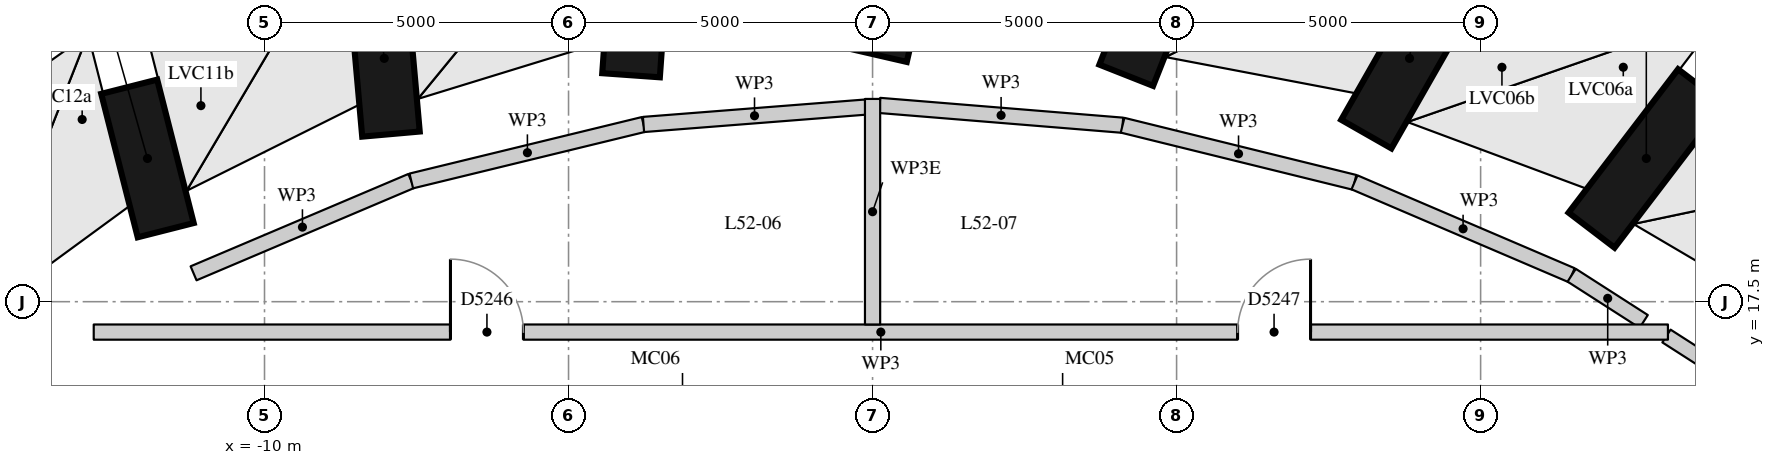
"""IFC4 building model, lengths in metres.
Left out: names, types, materials, properties, quantities, classifications, styles, units other than length and angle.
Written with IfcOpenShell. Run it as: python <this file> out.ifc"""

import sys

from ifc_helpers import new_model, si_unit, direction, frame, frame_2d, origin, origin_2d, place, context, subcontext, project, spatial, rectangle, extrude, element, fill, save


model = new_model("IFC4")
c1 = context("Model", 3, precision=1e-05, world=origin(), true_north=direction((0.0, 1.0)))
c2 = subcontext(c1, "Body", "Model", "MODEL_VIEW")
j1 = project(units=[si_unit("LENGTHUNIT", "METRE"), si_unit("PLANEANGLEUNIT", "RADIAN")], contexts=[c1])
p1 = place(None, origin())
s1 = spatial("IfcSite", under=j1, at=p1, CompositionType="ELEMENT")
p2 = place(p1, origin())
s2 = spatial("IfcBuilding", under=s1, at=p2, CompositionType="ELEMENT")
p3 = place(p2, frame((0.0, 0.0, 184.7)))
s3 = spatial("IfcBuildingStorey", under=s2, at=p3, CompositionType="ELEMENT", Elevation=184.7)
p4 = place(p3, frame((11.825, 18.676, 0.482), z_axis=(0.389978273493, 0.511049786856, 0.765992859992), x_axis=(-0.464682275794, -0.608946175061, 0.642849079055)))
e1 = element("IfcColumn", 1, at=p4, inside=s3, PredefinedType="COLUMN", context=c2, shape_type="SweptSolid", body=[
    extrude(rectangle(XDim=1.5, YDim=0.95, at=origin_2d()), origin(), (0.0, 0.0, 1.0), 4.616),
])
p5 = place(p3, frame((8.12, 20.256, 0.471), z_axis=(0.310881556379, 0.545111045162, 0.778592708896), x_axis=(-0.385719039758, -0.676333814558, 0.627529595839)))
e2 = element("IfcColumn", 2, at=p5, inside=s3, PredefinedType="COLUMN", context=c2, shape_type="SweptSolid", body=[
    extrude(rectangle(XDim=1.5, YDim=0.95, at=origin_2d()), origin(), (0.0, 0.0, 1.0), 4.571),
])
p6 = place(p3, frame((4.172, 21.224, 0.458), z_axis=(0.224562667741, 0.568309652414, 0.79157801083), x_axis=(-0.290898612957, -0.736188660745, 0.611068124492)))
e3 = element("IfcColumn", 3, at=p6, inside=s3, PredefinedType="COLUMN", context=c2, shape_type="SweptSolid", body=[
    extrude(rectangle(XDim=1.5, YDim=0.95, at=origin_2d()), origin(), (0.0, 0.0, 1.0), 4.527),
])
p7 = place(p3, frame((0.1, 21.55, 0.446), z_axis=(0.133671482854, 0.579351901062, 0.804041857995), x_axis=(-0.180764216375, -0.783458746512, 0.594572695801)))
e4 = element("IfcColumn", 4, at=p7, inside=s3, PredefinedType="COLUMN", context=c2, shape_type="SweptSolid", body=[
    extrude(rectangle(XDim=1.5, YDim=0.95, at=origin_2d()), origin(), (0.0, 0.0, 1.0), 4.488),
])
p8 = place(p3, frame((-3.972, 21.224, 0.434), z_axis=(0.04116386065, 0.57760953865, 0.815274651536), x_axis=(-0.057954294046, -0.813212184635, 0.579074470654)))
e5 = element("IfcColumn", 5, at=p8, inside=s3, PredefinedType="COLUMN", context=c2, shape_type="SweptSolid", body=[
    extrude(rectangle(XDim=1.5, YDim=0.95, at=origin_2d()), origin(), (0.0, 0.0, 1.0), 4.454),
])
p9 = place(p3, frame((-7.92, 20.256, 0.424), z_axis=(-0.049857257906, 0.562824465626, 0.825071436136), x_axis=(0.072803061386, -0.821853143195, 0.56502842873)))
e6 = element("IfcColumn", 6, at=p9, inside=s3, PredefinedType="COLUMN", context=c2, shape_type="SweptSolid", body=[
    extrude(rectangle(XDim=1.5, YDim=0.95, at=origin_2d()), origin(), (0.0, 0.0, 1.0), 4.427),
])
p10 = place(p3, frame((-11.625, 18.676, 0.415), z_axis=(-0.136239004263, 0.535533465904, 0.833452362534), x_axis=(0.20548408429, -0.807724663309, 0.552591313166)))
e7 = element("IfcColumn", 7, at=p10, inside=s3, PredefinedType="COLUMN", context=c2, shape_type="SweptSolid", body=[
    extrude(rectangle(XDim=1.5, YDim=0.95, at=origin_2d()), origin(), (0.0, 0.0, 1.0), 4.405),
])
p11 = place(p3, frame((14.718, 15.869, 0.0), z_axis=(0.0, 0.0, 1.0), x_axis=(-0.841680298143, 0.539976180695, 0.0)))
e8 = element("IfcWall", 8, at=p11, inside=s3, PredefinedType="PARTITIONING", context=c2, shape_type="SweptSolid", body=[
    extrude(rectangle(XDim=1.974, YDim=0.25, at=frame_2d((0.987, 0.0))), origin(), (0.0, 0.0, 1.0), 4.22),
])
p12 = place(p3, frame((-7.586, 19.486, 0.0), z_axis=(0.0, 0.0, 1.0), x_axis=(-0.920602981077, -0.390499873536, 0.0)))
e9 = element("IfcWall", 9, at=p12, inside=s3, PredefinedType="PARTITIONING", context=c2, shape_type="SweptSolid", body=[
    extrude(rectangle(XDim=3.889, YDim=0.25, at=frame_2d((1.945, 0.0))), origin(), (0.0, 0.0, 1.0), 4.22),
])
p13 = place(p3, frame((-3.767, 20.415, 0.0), z_axis=(0.0, 0.0, 1.0), x_axis=(-0.971654107781, -0.236407053264, 0.0)))
e10 = element("IfcWall", 10, at=p13, inside=s3, PredefinedType="PARTITIONING", context=c2, shape_type="SweptSolid", body=[
    extrude(rectangle(XDim=3.93, YDim=0.25, at=frame_2d((1.965, 0.0))), origin(), (0.0, 0.0, 1.0), 4.22),
])
p14 = place(p3, frame((-0.116, 20.701, 0.0), z_axis=(0.0, 0.0, 1.0), x_axis=(-0.996948863072, -0.078057443077, 0.0)))
e11 = element("IfcWall", 11, at=p14, inside=s3, PredefinedType="PARTITIONING", context=c2, shape_type="SweptSolid", body=[
    extrude(rectangle(XDim=3.663, YDim=0.25, at=frame_2d((1.831, 0.0))), origin(), (0.0, 0.0, 1.0), 4.22),
])
p15 = place(p3, frame((4.112, 20.402, 0.0), z_axis=(0.0, 0.0, 1.0), x_axis=(-0.996694485566, 0.081241014527, 0.0)))
e12 = element("IfcWall", 12, at=p15, inside=s3, PredefinedType="PARTITIONING", context=c2, shape_type="SweptSolid", body=[
    extrude(rectangle(XDim=4.009, YDim=0.25, at=frame_2d((2.004, 0.0))), origin(), (0.0, 0.0, 1.0), 4.22),
])
p16 = place(p3, frame((7.926, 19.463, 0.0), z_axis=(0.0, 0.0, 1.0), x_axis=(-0.970984692247, 0.239141647194, 0.0)))
e13 = element("IfcWall", 13, at=p16, inside=s3, PredefinedType="PARTITIONING", context=c2, shape_type="SweptSolid", body=[
    extrude(rectangle(XDim=3.928, YDim=0.25, at=frame_2d((1.964, 0.0))), origin(), (0.0, 0.0, 1.0), 4.22),
])
p17 = place(p3, frame((11.498, 17.935, 0.0), z_axis=(0.0, 0.0, 1.0), x_axis=(-0.919440581638, 0.393228962359, 0.0)))
e14 = element("IfcWall", 14, at=p17, inside=s3, PredefinedType="PARTITIONING", context=c2, shape_type="SweptSolid", body=[
    extrude(rectangle(XDim=3.885, YDim=0.25, at=frame_2d((1.942, 0.0))), origin(), (0.0, 0.0, 1.0), 4.22),
])
p18 = place(p3, frame((12.683, 17.175, 0.0), z_axis=(0.0, 0.0, 1.0), x_axis=(-0.84171341623, 0.539924554858, 0.0)))
e15 = element("IfcWall", 15, at=p18, inside=s3, PredefinedType="PARTITIONING", context=c2, shape_type="SweptSolid", body=[
    extrude(rectangle(XDim=1.408, YDim=0.25, at=frame_2d((0.704, 0.0))), origin(), (0.0, 0.0, 1.0), 4.22),
])
p19 = place(p3, frame((-12.809, 17.0, 0.0), z_axis=(0.0, 0.0, 1.0), x_axis=(1.0, 0.0, 0.0)))
e16 = element("IfcWall", 16, at=p19, inside=s3, PredefinedType="PARTITIONING", context=c2, shape_type="SweptSolid", body=[
    extrude(rectangle(XDim=25.889, YDim=0.25, at=frame_2d((12.945, 0.0))), origin(), (0.0, 0.0, 1.0), 4.22),
])
p20 = place(p19, frame((5.867, 0.0, 0.0)))
e17 = element("IfcOpeningElement", 17, at=p20, cuts=e16, PredefinedType="OPENING", context=c2, shape_type="SweptSolid", body=[
    extrude(rectangle(XDim=1.2, YDim=2.1, at=frame_2d((0.6, 1.05))), frame((0.0, 0.135, 0.0), z_axis=(0.0, -1.0, 0.0), x_axis=(1.0, 0.0, 0.0)), (0.0, 0.0, 1.0), 0.27),
])
p21 = place(p19, frame((18.812, 0.0, 0.0)))
e18 = element("IfcOpeningElement", 18, at=p21, cuts=e16, PredefinedType="OPENING", context=c2, shape_type="SweptSolid", body=[
    extrude(rectangle(XDim=1.2, YDim=2.1, at=frame_2d((0.6, 1.05))), frame((0.0, 0.135, 0.0), z_axis=(0.0, -1.0, 0.0), x_axis=(1.0, 0.0, 0.0)), (0.0, 0.0, 1.0), 0.27),
])
p22 = place(p3, frame((0.0, 17.125, 0.0), z_axis=(0.0, 0.0, 1.0), x_axis=(0.0, 1.0, 0.0)))
e19 = element("IfcWall", 19, at=p22, inside=s3, PredefinedType="PARTITIONING", context=c2, shape_type="SweptSolid", body=[
    extrude(rectangle(XDim=3.71, YDim=0.25, at=frame_2d((1.855, 0.0))), origin(), (0.0, 0.0, 1.0), 3.67),
])
p23 = place(p20, origin())
e20 = element("IfcDoor", 20, at=p23, inside=s3, OperationType="SINGLE_SWING_LEFT", PredefinedType="DOOR", context=c2, shape_type="SweptSolid", body=[
    extrude(rectangle(XDim=1.2, YDim=2.1, at=frame_2d((0.6, 1.05))), frame((0.0, 0.025, 0.0), z_axis=(0.0, -1.0, 0.0), x_axis=(1.0, 0.0, 0.0)), (0.0, 0.0, 1.0), 0.05),
])
fill(e17, e20)
p24 = place(p21, origin())
e21 = element("IfcDoor", 21, at=p24, inside=s3, OperationType="SINGLE_SWING_RIGHT", PredefinedType="DOOR", context=c2, shape_type="SweptSolid", body=[
    extrude(rectangle(XDim=1.2, YDim=2.1, at=frame_2d((0.6, 1.05))), frame((0.0, 0.025, 0.0), z_axis=(0.0, -1.0, 0.0), x_axis=(1.0, 0.0, 0.0)), (0.0, 0.0, 1.0), 0.05),
])
fill(e18, e21)
save(model, sys.argv[1])
